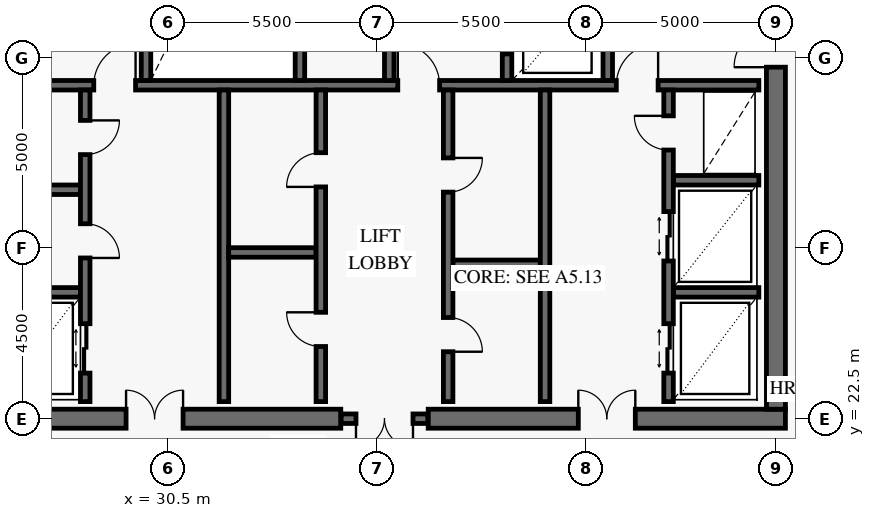
"""IFC4 building model, lengths in metres.
Left out: names, types, materials, properties, quantities, classifications, styles, units other than length and angle.
Written with IfcOpenShell. Run it as: python <this file> out.ifc"""

import sys

from ifc_helpers import new_model, si_unit, direction, frame, frame_2d, origin, place, context, subcontext, project, spatial, rectangle, extrude, element, fill, save


model = new_model("IFC4")
c1 = context("Model", 3, precision=1e-05, world=origin(), true_north=direction((0.0, 1.0)))
c2 = subcontext(c1, "Body", "Model", "MODEL_VIEW")
j1 = project(units=[si_unit("LENGTHUNIT", "METRE"), si_unit("PLANEANGLEUNIT", "RADIAN")], contexts=[c1])
p1 = place(None, origin())
s1 = spatial("IfcSite", under=j1, at=p1, CompositionType="ELEMENT")
p2 = place(p1, origin())
s2 = spatial("IfcBuilding", under=s1, at=p2, CompositionType="ELEMENT")
p3 = place(p2, frame((0.0, 0.0, 357.6)))
s3 = spatial("IfcBuildingStorey", under=s2, at=p3, CompositionType="ELEMENT", Elevation=357.6)
p4 = place(p3, frame((25.25, 22.5, 0.0), z_axis=(0.0, 0.0, 1.0), x_axis=(1.0, 0.0, 0.0)))
e1 = element("IfcWall", 1, at=p4, inside=s3, PredefinedType="SHEAR", context=c2, shape_type="SweptSolid", body=[
    extrude(rectangle(XDim=9.8, YDim=0.5, at=frame_2d((4.9, 0.0))), origin(), (0.0, 0.0, 1.0), 3.8),
])
p5 = place(p4, frame((4.15, 0.0, 0.0)))
e2 = element("IfcOpeningElement", 2, at=p5, cuts=e1, PredefinedType="OPENING", context=c2, shape_type="SweptSolid", body=[
    extrude(rectangle(XDim=1.5, YDim=2.15, at=frame_2d((0.75, 1.075))), frame((0.0, 0.262, 0.0), z_axis=(0.0, -1.0, 0.0), x_axis=(1.0, 0.0, 0.0)), (0.0, 0.0, 1.0), 0.524),
])
p6 = place(p3, frame((37.35, 22.5, 0.0), z_axis=(0.0, 0.0, 1.0), x_axis=(1.0, 0.0, 0.0)))
e3 = element("IfcWall", 3, at=p6, inside=s3, PredefinedType="SHEAR", context=c2, shape_type="SweptSolid", body=[
    extrude(rectangle(XDim=9.4, YDim=0.5, at=frame_2d((4.7, 0.0))), origin(), (0.0, 0.0, 1.0), 3.8),
])
p7 = place(p6, frame((3.95, 0.0, 0.0)))
e4 = element("IfcOpeningElement", 4, at=p7, cuts=e3, PredefinedType="OPENING", context=c2, shape_type="SweptSolid", body=[
    extrude(rectangle(XDim=1.5, YDim=2.15, at=frame_2d((0.75, 1.075))), frame((0.0, 0.262, 0.0), z_axis=(0.0, -1.0, 0.0), x_axis=(1.0, 0.0, 0.0)), (0.0, 0.0, 1.0), 0.524),
])
p8 = place(p3, frame((46.5, 22.75, 0.0), z_axis=(0.0, 0.0, 1.0), x_axis=(0.0, 1.0, 0.0)))
e5 = element("IfcWall", 5, at=p8, inside=s3, PredefinedType="SHEAR", context=c2, shape_type="SweptSolid", body=[
    extrude(rectangle(XDim=18.5, YDim=0.5, at=frame_2d((9.25, 0.0))), origin(), (0.0, 0.0, 1.0), 3.8),
])
p9 = place(p8, frame((9.0, 0.0, 0.0)))
e6 = element("IfcOpeningElement", 6, at=p9, cuts=e5, PredefinedType="OPENING", context=c2, shape_type="SweptSolid", body=[
    extrude(rectangle(XDim=1.1, YDim=2.15, at=frame_2d((0.55, 1.075))), frame((0.0, 0.262, 0.0), z_axis=(0.0, -1.0, 0.0), x_axis=(1.0, 0.0, 0.0)), (0.0, 0.0, 1.0), 0.524),
])
p10 = place(p3, frame((35.06, 22.5, 0.0), z_axis=(0.0, 0.0, 1.0), x_axis=(1.0, 0.0, 0.0)))
e7 = element("IfcWall", 7, at=p10, inside=s3, PredefinedType="SOLIDWALL", context=c2, shape_type="SweptSolid", body=[
    extrude(rectangle(XDim=2.28, YDim=0.25, at=frame_2d((1.14, 0.0))), origin(), (0.0, 0.0, 1.0), 3.8),
])
p11 = place(p10, frame((0.39, 0.0, 0.0)))
e8 = element("IfcOpeningElement", 8, at=p11, cuts=e7, PredefinedType="OPENING", context=c2, shape_type="SweptSolid", body=[
    extrude(rectangle(XDim=1.5, YDim=2.15, at=frame_2d((0.75, 1.075))), frame((0.0, 0.137, 0.0), z_axis=(0.0, -1.0, 0.0), x_axis=(1.0, 0.0, 0.0)), (0.0, 0.0, 1.0), 0.274),
])
p12 = place(p3, frame((25.95, 31.275, 0.0), z_axis=(0.0, 0.0, 1.0), x_axis=(1.0, 0.0, 0.0)))
e9 = element("IfcWall", 9, at=p12, inside=s3, PredefinedType="SOLIDWALL", context=c2, shape_type="SweptSolid", body=[
    extrude(rectangle(XDim=20.1, YDim=0.25, at=frame_2d((10.05, 0.0))), origin(), (0.0, 0.0, 1.0), 3.8),
])
p13 = place(p12, frame((2.6, 0.0, 0.0)))
e10 = element("IfcOpeningElement", 10, at=p13, cuts=e9, PredefinedType="OPENING", context=c2, shape_type="SweptSolid", body=[
    extrude(rectangle(XDim=1.1, YDim=2.15, at=frame_2d((0.55, 1.075))), frame((0.0, 0.137, 0.0), z_axis=(0.0, -1.0, 0.0), x_axis=(1.0, 0.0, 0.0)), (0.0, 0.0, 1.0), 0.274),
])
p14 = place(p12, frame((10.6, 0.0, 0.0)))
e11 = element("IfcOpeningElement", 11, at=p14, cuts=e9, PredefinedType="OPENING", context=c2, shape_type="SweptSolid", body=[
    extrude(rectangle(XDim=1.1, YDim=2.15, at=frame_2d((0.55, 1.075))), frame((0.0, 0.137, 0.0), z_axis=(0.0, -1.0, 0.0), x_axis=(1.0, 0.0, 0.0)), (0.0, 0.0, 1.0), 0.274),
])
p15 = place(p12, frame((16.35, 0.0, 0.0)))
e12 = element("IfcOpeningElement", 12, at=p15, cuts=e9, PredefinedType="OPENING", context=c2, shape_type="SweptSolid", body=[
    extrude(rectangle(XDim=1.1, YDim=2.15, at=frame_2d((0.55, 1.075))), frame((0.0, 0.137, 0.0), z_axis=(0.0, -1.0, 0.0), x_axis=(1.0, 0.0, 0.0)), (0.0, 0.0, 1.0), 0.274),
])
for number, where, z_axis, x_axis in (
    (13, (29.925, 31.4, 0.0), (0.0, 0.0, 1.0), (0.0, 1.0, 0.0)),
    (14, (33.975, 31.4, 0.0), (0.0, 0.0, 1.0), (0.0, 1.0, 0.0)),
    (15, (42.075, 31.4, 0.0), (0.0, 0.0, 1.0), (0.0, 1.0, 0.0)),
):
    element("IfcWall", number, at=place(p3, frame(where, z_axis=z_axis, x_axis=x_axis)), inside=s3, PredefinedType="SOLIDWALL", context=c2, shape_type="SweptSolid", body=[
        extrude(rectangle(XDim=9.7, YDim=0.25, at=frame_2d((4.85, 0.0))), origin(), (0.0, 0.0, 1.0), 3.8),
    ])
p16 = place(p3, frame((36.325, 31.4, 0.0), z_axis=(0.0, 0.0, 1.0), x_axis=(0.0, 1.0, 0.0)))
e16 = element("IfcWall", 16, at=p16, inside=s3, PredefinedType="SOLIDWALL", context=c2, shape_type="SweptSolid", body=[
    extrude(rectangle(XDim=9.65, YDim=0.25, at=frame_2d((4.825, 0.0))), origin(), (0.0, 0.0, 1.0), 3.8),
])
p17 = place(p16, frame((1.49, 0.0, 0.0)))
e17 = element("IfcOpeningElement", 17, at=p17, cuts=e16, PredefinedType="OPENING", context=c2, shape_type="SweptSolid", body=[
    extrude(rectangle(XDim=0.9, YDim=2.1, at=frame_2d((0.45, 1.05))), frame((0.0, 0.137, 0.0), z_axis=(0.0, -1.0, 0.0), x_axis=(1.0, 0.0, 0.0)), (0.0, 0.0, 1.0), 0.274),
])
p18 = place(p16, frame((6.41, 0.0, 0.0)))
e18 = element("IfcOpeningElement", 18, at=p18, cuts=e16, PredefinedType="OPENING", context=c2, shape_type="SweptSolid", body=[
    extrude(rectangle(XDim=0.9, YDim=2.1, at=frame_2d((0.45, 1.05))), frame((0.0, 0.137, 0.0), z_axis=(0.0, -1.0, 0.0), x_axis=(1.0, 0.0, 0.0)), (0.0, 0.0, 1.0), 0.274),
])
p19 = place(p3, frame((39.425, 31.4, 0.0), z_axis=(0.0, 0.0, 1.0), x_axis=(0.0, 1.0, 0.0)))
e19 = element("IfcWall", 19, at=p19, inside=s3, PredefinedType="SOLIDWALL", context=c2, shape_type="SweptSolid", body=[
    extrude(rectangle(XDim=9.65, YDim=0.25, at=frame_2d((4.825, 0.0))), origin(), (0.0, 0.0, 1.0), 3.8),
])
p20 = place(p19, frame((0.7, 0.0, 0.0)))
e20 = element("IfcOpeningElement", 20, at=p20, cuts=e19, PredefinedType="OPENING", context=c2, shape_type="SweptSolid", body=[
    extrude(rectangle(XDim=1.1, YDim=2.2, at=frame_2d((0.55, 1.1))), frame((0.0, 0.137, 0.0), z_axis=(0.0, -1.0, 0.0), x_axis=(1.0, 0.0, 0.0)), (0.0, 0.0, 1.0), 0.274),
])
p21 = place(p19, frame((3.45, 0.0, 0.0)))
e21 = element("IfcOpeningElement", 21, at=p21, cuts=e19, PredefinedType="OPENING", context=c2, shape_type="SweptSolid", body=[
    extrude(rectangle(XDim=1.1, YDim=2.2, at=frame_2d((0.55, 1.1))), frame((0.0, 0.137, 0.0), z_axis=(0.0, -1.0, 0.0), x_axis=(1.0, 0.0, 0.0)), (0.0, 0.0, 1.0), 0.274),
])
p22 = place(p19, frame((6.2, 0.0, 0.0)))
e22 = element("IfcOpeningElement", 22, at=p22, cuts=e19, PredefinedType="OPENING", context=c2, shape_type="SweptSolid", body=[
    extrude(rectangle(XDim=1.1, YDim=2.2, at=frame_2d((0.55, 1.1))), frame((0.0, 0.137, 0.0), z_axis=(0.0, -1.0, 0.0), x_axis=(1.0, 0.0, 0.0)), (0.0, 0.0, 1.0), 0.274),
])
p23 = place(p19, frame((8.47, 0.0, 0.0)))
e23 = element("IfcOpeningElement", 23, at=p23, cuts=e19, PredefinedType="OPENING", context=c2, shape_type="SweptSolid", body=[
    extrude(rectangle(XDim=0.9, YDim=2.1, at=frame_2d((0.45, 1.05))), frame((0.0, 0.137, 0.0), z_axis=(0.0, -1.0, 0.0), x_axis=(1.0, 0.0, 0.0)), (0.0, 0.0, 1.0), 0.274),
])
for number, where, z_axis, x_axis in (
    (24, (25.95, 25.825, 0.0), (0.0, 0.0, 1.0), (1.0, 0.0, 0.0)),
    (25, (25.95, 28.525, 0.0), (0.0, 0.0, 1.0), (1.0, 0.0, 0.0)),
):
    element("IfcWall", number, at=place(p3, frame(where, z_axis=z_axis, x_axis=x_axis)), inside=s3, PredefinedType="SOLIDWALL", context=c2, shape_type="SweptSolid", body=[
        extrude(rectangle(XDim=2.25, YDim=0.25, at=frame_2d((1.125, 0.0))), origin(), (0.0, 0.0, 1.0), 3.8),
    ])
p24 = place(p3, frame((28.325, 22.95, 0.0), z_axis=(0.0, 0.0, 1.0), x_axis=(0.0, 1.0, 0.0)))
e26 = element("IfcWall", 26, at=p24, inside=s3, PredefinedType="SOLIDWALL", context=c2, shape_type="SweptSolid", body=[
    extrude(rectangle(XDim=8.2, YDim=0.25, at=frame_2d((4.1, 0.0))), origin(), (0.0, 0.0, 1.0), 3.8),
])
p25 = place(p24, frame((0.75, 0.0, 0.0)))
e27 = element("IfcOpeningElement", 27, at=p25, cuts=e26, PredefinedType="OPENING", context=c2, shape_type="SweptSolid", body=[
    extrude(rectangle(XDim=1.3, YDim=2.3, at=frame_2d((0.65, 1.15))), frame((0.0, 0.137, 0.0), z_axis=(0.0, -1.0, 0.0), x_axis=(1.0, 0.0, 0.0)), (0.0, 0.0, 1.0), 0.274),
])
p26 = place(p24, frame((3.78, 0.0, 0.0)))
e28 = element("IfcOpeningElement", 28, at=p26, cuts=e26, PredefinedType="OPENING", context=c2, shape_type="SweptSolid", body=[
    extrude(rectangle(XDim=0.9, YDim=2.1, at=frame_2d((0.45, 1.05))), frame((0.0, 0.137, 0.0), z_axis=(0.0, -1.0, 0.0), x_axis=(1.0, 0.0, 0.0)), (0.0, 0.0, 1.0), 0.274),
])
p27 = place(p24, frame((6.5, 0.0, 0.0)))
e29 = element("IfcOpeningElement", 29, at=p27, cuts=e26, PredefinedType="OPENING", context=c2, shape_type="SweptSolid", body=[
    extrude(rectangle(XDim=0.9, YDim=2.1, at=frame_2d((0.45, 1.05))), frame((0.0, 0.137, 0.0), z_axis=(0.0, -1.0, 0.0), x_axis=(1.0, 0.0, 0.0)), (0.0, 0.0, 1.0), 0.274),
])
p28 = place(p3, frame((31.975, 22.95, 0.0), z_axis=(0.0, 0.0, 1.0), x_axis=(0.0, 1.0, 0.0)))
e30 = element("IfcWall", 30, at=p28, inside=s3, PredefinedType="SOLIDWALL", context=c2, shape_type="SweptSolid", body=[
    extrude(rectangle(XDim=8.2, YDim=0.25, at=frame_2d((4.1, 0.0))), origin(), (0.0, 0.0, 1.0), 3.8),
])
p29 = place(p3, frame((32.1, 26.875, 0.0), z_axis=(0.0, 0.0, 1.0), x_axis=(1.0, 0.0, 0.0)))
e31 = element("IfcWall", 31, at=p29, inside=s3, PredefinedType="SOLIDWALL", context=c2, shape_type="SweptSolid", body=[
    extrude(rectangle(XDim=2.3, YDim=0.25, at=frame_2d((1.15, 0.0))), origin(), (0.0, 0.0, 1.0), 3.8),
])
p30 = place(p3, frame((34.525, 22.95, 0.0), z_axis=(0.0, 0.0, 1.0), x_axis=(0.0, 1.0, 0.0)))
e32 = element("IfcWall", 32, at=p30, inside=s3, PredefinedType="SOLIDWALL", context=c2, shape_type="SweptSolid", body=[
    extrude(rectangle(XDim=8.2, YDim=0.25, at=frame_2d((4.1, 0.0))), origin(), (0.0, 0.0, 1.0), 3.8),
])
p31 = place(p30, frame((1.45, 0.0, 0.0)))
e33 = element("IfcOpeningElement", 33, at=p31, cuts=e32, PredefinedType="OPENING", context=c2, shape_type="SweptSolid", body=[
    extrude(rectangle(XDim=0.9, YDim=2.1, at=frame_2d((0.45, 1.05))), frame((0.0, 0.137, 0.0), z_axis=(0.0, -1.0, 0.0), x_axis=(1.0, 0.0, 0.0)), (0.0, 0.0, 1.0), 0.274),
])
p32 = place(p30, frame((5.65, 0.0, 0.0)))
e34 = element("IfcOpeningElement", 34, at=p32, cuts=e32, PredefinedType="OPENING", context=c2, shape_type="SweptSolid", body=[
    extrude(rectangle(XDim=0.9, YDim=2.1, at=frame_2d((0.45, 1.05))), frame((0.0, 0.137, 0.0), z_axis=(0.0, -1.0, 0.0), x_axis=(1.0, 0.0, 0.0)), (0.0, 0.0, 1.0), 0.274),
])
p33 = place(p3, frame((38.0, 26.55, 0.0), z_axis=(0.0, 0.0, 1.0), x_axis=(1.0, 0.0, 0.0)))
e35 = element("IfcWall", 35, at=p33, inside=s3, PredefinedType="SOLIDWALL", context=c2, shape_type="SweptSolid", body=[
    extrude(rectangle(XDim=2.3, YDim=0.25, at=frame_2d((1.15, 0.0))), origin(), (0.0, 0.0, 1.0), 3.8),
])
p34 = place(p3, frame((37.875, 22.95, 0.0), z_axis=(0.0, 0.0, 1.0), x_axis=(0.0, 1.0, 0.0)))
e36 = element("IfcWall", 36, at=p34, inside=s3, PredefinedType="SOLIDWALL", context=c2, shape_type="SweptSolid", body=[
    extrude(rectangle(XDim=8.2, YDim=0.25, at=frame_2d((4.1, 0.0))), origin(), (0.0, 0.0, 1.0), 3.8),
])
p35 = place(p34, frame((1.312, 0.0, 0.0)))
e37 = element("IfcOpeningElement", 37, at=p35, cuts=e36, PredefinedType="OPENING", context=c2, shape_type="SweptSolid", body=[
    extrude(rectangle(XDim=0.9, YDim=2.1, at=frame_2d((0.45, 1.05))), frame((0.0, 0.137, 0.0), z_axis=(0.0, -1.0, 0.0), x_axis=(1.0, 0.0, 0.0)), (0.0, 0.0, 1.0), 0.274),
])
p36 = place(p34, frame((5.512, 0.0, 0.0)))
e38 = element("IfcOpeningElement", 38, at=p36, cuts=e36, PredefinedType="OPENING", context=c2, shape_type="SweptSolid", body=[
    extrude(rectangle(XDim=0.9, YDim=2.1, at=frame_2d((0.45, 1.05))), frame((0.0, 0.137, 0.0), z_axis=(0.0, -1.0, 0.0), x_axis=(1.0, 0.0, 0.0)), (0.0, 0.0, 1.0), 0.274),
])
p37 = place(p3, frame((40.425, 22.95, 0.0), z_axis=(0.0, 0.0, 1.0), x_axis=(0.0, 1.0, 0.0)))
e39 = element("IfcWall", 39, at=p37, inside=s3, PredefinedType="SOLIDWALL", context=c2, shape_type="SweptSolid", body=[
    extrude(rectangle(XDim=8.2, YDim=0.25, at=frame_2d((4.1, 0.0))), origin(), (0.0, 0.0, 1.0), 3.8),
])
for number, where, z_axis, x_axis in (
    (40, (43.8, 25.825, 0.0), (0.0, 0.0, 1.0), (1.0, 0.0, 0.0)),
    (41, (43.8, 28.775, 0.0), (0.0, 0.0, 1.0), (1.0, 0.0, 0.0)),
):
    element("IfcWall", number, at=place(p3, frame(where, z_axis=z_axis, x_axis=x_axis)), inside=s3, PredefinedType="SOLIDWALL", context=c2, shape_type="SweptSolid", body=[
        extrude(rectangle(XDim=2.25, YDim=0.25, at=frame_2d((1.125, 0.0))), origin(), (0.0, 0.0, 1.0), 3.8),
    ])
p38 = place(p3, frame((43.675, 22.95, 0.0), z_axis=(0.0, 0.0, 1.0), x_axis=(0.0, 1.0, 0.0)))
e42 = element("IfcWall", 42, at=p38, inside=s3, PredefinedType="SOLIDWALL", context=c2, shape_type="SweptSolid", body=[
    extrude(rectangle(XDim=8.2, YDim=0.25, at=frame_2d((4.1, 0.0))), origin(), (0.0, 0.0, 1.0), 3.8),
])
p39 = place(p38, frame((0.75, 0.0, 0.0)))
e43 = element("IfcOpeningElement", 43, at=p39, cuts=e42, PredefinedType="OPENING", context=c2, shape_type="SweptSolid", body=[
    extrude(rectangle(XDim=1.3, YDim=2.3, at=frame_2d((0.65, 1.15))), frame((0.0, 0.137, 0.0), z_axis=(0.0, -1.0, 0.0), x_axis=(1.0, 0.0, 0.0)), (0.0, 0.0, 1.0), 0.274),
])
p40 = place(p38, frame((3.7, 0.0, 0.0)))
e44 = element("IfcOpeningElement", 44, at=p40, cuts=e42, PredefinedType="OPENING", context=c2, shape_type="SweptSolid", body=[
    extrude(rectangle(XDim=1.3, YDim=2.3, at=frame_2d((0.65, 1.15))), frame((0.0, 0.137, 0.0), z_axis=(0.0, -1.0, 0.0), x_axis=(1.0, 0.0, 0.0)), (0.0, 0.0, 1.0), 0.274),
])
p41 = place(p38, frame((6.62, 0.0, 0.0)))
e45 = element("IfcOpeningElement", 45, at=p41, cuts=e42, PredefinedType="OPENING", context=c2, shape_type="SweptSolid", body=[
    extrude(rectangle(XDim=0.9, YDim=2.1, at=frame_2d((0.45, 1.05))), frame((0.0, 0.137, 0.0), z_axis=(0.0, -1.0, 0.0), x_axis=(1.0, 0.0, 0.0)), (0.0, 0.0, 1.0), 0.274),
])
p42 = place(p9, origin())
e46 = element("IfcDoor", 46, at=p42, inside=s3, OperationType="SINGLE_SWING_LEFT", PredefinedType="USERDEFINED", context=c2, shape_type="SweptSolid", body=[
    extrude(rectangle(XDim=1.1, YDim=2.15, at=frame_2d((0.55, 1.075))), frame((0.0, 0.025, 0.0), z_axis=(0.0, -1.0, 0.0), x_axis=(1.0, 0.0, 0.0)), (0.0, 0.0, 1.0), 0.05),
])
fill(e6, e46)
p43 = place(p5, origin())
e47 = element("IfcDoor", 47, at=p43, inside=s3, OperationType="DOUBLE_DOOR_SINGLE_SWING", PredefinedType="DOOR", context=c2, shape_type="SweptSolid", body=[
    extrude(rectangle(XDim=1.5, YDim=2.15, at=frame_2d((0.75, 1.075))), frame((0.0, 0.025, 0.0), z_axis=(0.0, -1.0, 0.0), x_axis=(1.0, 0.0, 0.0)), (0.0, 0.0, 1.0), 0.05),
])
fill(e2, e47)
p44 = place(p7, origin())
e48 = element("IfcDoor", 48, at=p44, inside=s3, OperationType="DOUBLE_DOOR_SINGLE_SWING", PredefinedType="DOOR", context=c2, shape_type="SweptSolid", body=[
    extrude(rectangle(XDim=1.5, YDim=2.15, at=frame_2d((0.75, 1.075))), frame((0.0, 0.025, 0.0), z_axis=(0.0, -1.0, 0.0), x_axis=(1.0, 0.0, 0.0)), (0.0, 0.0, 1.0), 0.05),
])
fill(e4, e48)
p45 = place(p11, frame((1.5, 0.0, 0.0), z_axis=(0.0, 0.0, 1.0), x_axis=(-1.0, 0.0, 0.0)))
e49 = element("IfcDoor", 49, at=p45, inside=s3, OperationType="DOUBLE_DOOR_SINGLE_SWING", PredefinedType="DOOR", context=c2, shape_type="SweptSolid", body=[
    extrude(rectangle(XDim=1.5, YDim=2.15, at=frame_2d((0.75, 1.075))), frame((0.0, 0.025, 0.0), z_axis=(0.0, -1.0, 0.0), x_axis=(1.0, 0.0, 0.0)), (0.0, 0.0, 1.0), 0.05),
])
fill(e8, e49)
p46 = place(p13, origin())
e50 = element("IfcDoor", 50, at=p46, inside=s3, OperationType="SINGLE_SWING_RIGHT", PredefinedType="USERDEFINED", context=c2, shape_type="SweptSolid", body=[
    extrude(rectangle(XDim=1.1, YDim=2.15, at=frame_2d((0.55, 1.075))), frame((0.0, 0.025, 0.0), z_axis=(0.0, -1.0, 0.0), x_axis=(1.0, 0.0, 0.0)), (0.0, 0.0, 1.0), 0.05),
])
fill(e10, e50)
p47 = place(p14, origin())
e51 = element("IfcDoor", 51, at=p47, inside=s3, OperationType="SINGLE_SWING_LEFT", PredefinedType="USERDEFINED", context=c2, shape_type="SweptSolid", body=[
    extrude(rectangle(XDim=1.1, YDim=2.15, at=frame_2d((0.55, 1.075))), frame((0.0, 0.025, 0.0), z_axis=(0.0, -1.0, 0.0), x_axis=(1.0, 0.0, 0.0)), (0.0, 0.0, 1.0), 0.05),
])
fill(e11, e51)
p48 = place(p15, origin())
e52 = element("IfcDoor", 52, at=p48, inside=s3, OperationType="SINGLE_SWING_RIGHT", PredefinedType="USERDEFINED", context=c2, shape_type="SweptSolid", body=[
    extrude(rectangle(XDim=1.1, YDim=2.15, at=frame_2d((0.55, 1.075))), frame((0.0, 0.025, 0.0), z_axis=(0.0, -1.0, 0.0), x_axis=(1.0, 0.0, 0.0)), (0.0, 0.0, 1.0), 0.05),
])
fill(e12, e52)
p49 = place(p20, origin())
e53 = element("IfcDoor", 53, at=p49, inside=s3, OperationType="DOUBLE_DOOR_SLIDING", PredefinedType="DOOR", context=c2, shape_type="SweptSolid", body=[
    extrude(rectangle(XDim=1.1, YDim=2.2, at=frame_2d((0.55, 1.1))), frame((0.0, 0.025, 0.0), z_axis=(0.0, -1.0, 0.0), x_axis=(1.0, 0.0, 0.0)), (0.0, 0.0, 1.0), 0.05),
])
fill(e20, e53)
p50 = place(p25, frame((1.3, 0.0, 0.0), z_axis=(0.0, 0.0, 1.0), x_axis=(-1.0, 0.0, 0.0)))
e54 = element("IfcDoor", 54, at=p50, inside=s3, OperationType="DOUBLE_DOOR_SLIDING", PredefinedType="DOOR", context=c2, shape_type="SweptSolid", body=[
    extrude(rectangle(XDim=1.3, YDim=2.3, at=frame_2d((0.65, 1.15))), frame((0.0, 0.025, 0.0), z_axis=(0.0, -1.0, 0.0), x_axis=(1.0, 0.0, 0.0)), (0.0, 0.0, 1.0), 0.05),
])
fill(e27, e54)
p51 = place(p26, frame((0.9, 0.0, 0.0), z_axis=(0.0, 0.0, 1.0), x_axis=(-1.0, 0.0, 0.0)))
e55 = element("IfcDoor", 55, at=p51, inside=s3, OperationType="SINGLE_SWING_RIGHT", PredefinedType="DOOR", context=c2, shape_type="SweptSolid", body=[
    extrude(rectangle(XDim=0.9, YDim=2.1, at=frame_2d((0.45, 1.05))), frame((0.0, 0.025, 0.0), z_axis=(0.0, -1.0, 0.0), x_axis=(1.0, 0.0, 0.0)), (0.0, 0.0, 1.0), 0.05),
])
fill(e28, e55)
p52 = place(p27, frame((0.9, 0.0, 0.0), z_axis=(0.0, 0.0, 1.0), x_axis=(-1.0, 0.0, 0.0)))
e56 = element("IfcDoor", 56, at=p52, inside=s3, OperationType="SINGLE_SWING_LEFT", PredefinedType="DOOR", context=c2, shape_type="SweptSolid", body=[
    extrude(rectangle(XDim=0.9, YDim=2.1, at=frame_2d((0.45, 1.05))), frame((0.0, 0.025, 0.0), z_axis=(0.0, -1.0, 0.0), x_axis=(1.0, 0.0, 0.0)), (0.0, 0.0, 1.0), 0.05),
])
fill(e29, e56)
p53 = place(p31, origin())
e57 = element("IfcDoor", 57, at=p53, inside=s3, OperationType="SINGLE_SWING_RIGHT", PredefinedType="DOOR", context=c2, shape_type="SweptSolid", body=[
    extrude(rectangle(XDim=0.9, YDim=2.1, at=frame_2d((0.45, 1.05))), frame((0.0, 0.025, 0.0), z_axis=(0.0, -1.0, 0.0), x_axis=(1.0, 0.0, 0.0)), (0.0, 0.0, 1.0), 0.05),
])
fill(e33, e57)
p54 = place(p32, origin())
e58 = element("IfcDoor", 58, at=p54, inside=s3, OperationType="SINGLE_SWING_LEFT", PredefinedType="DOOR", context=c2, shape_type="SweptSolid", body=[
    extrude(rectangle(XDim=0.9, YDim=2.1, at=frame_2d((0.45, 1.05))), frame((0.0, 0.025, 0.0), z_axis=(0.0, -1.0, 0.0), x_axis=(1.0, 0.0, 0.0)), (0.0, 0.0, 1.0), 0.05),
])
fill(e34, e58)
p55 = place(p35, frame((0.9, 0.0, 0.0), z_axis=(0.0, 0.0, 1.0), x_axis=(-1.0, 0.0, 0.0)))
e59 = element("IfcDoor", 59, at=p55, inside=s3, OperationType="SINGLE_SWING_RIGHT", PredefinedType="DOOR", context=c2, shape_type="SweptSolid", body=[
    extrude(rectangle(XDim=0.9, YDim=2.1, at=frame_2d((0.45, 1.05))), frame((0.0, 0.025, 0.0), z_axis=(0.0, -1.0, 0.0), x_axis=(1.0, 0.0, 0.0)), (0.0, 0.0, 1.0), 0.05),
])
fill(e37, e59)
p56 = place(p36, frame((0.9, 0.0, 0.0), z_axis=(0.0, 0.0, 1.0), x_axis=(-1.0, 0.0, 0.0)))
e60 = element("IfcDoor", 60, at=p56, inside=s3, OperationType="SINGLE_SWING_LEFT", PredefinedType="DOOR", context=c2, shape_type="SweptSolid", body=[
    extrude(rectangle(XDim=0.9, YDim=2.1, at=frame_2d((0.45, 1.05))), frame((0.0, 0.025, 0.0), z_axis=(0.0, -1.0, 0.0), x_axis=(1.0, 0.0, 0.0)), (0.0, 0.0, 1.0), 0.05),
])
fill(e38, e60)
p57 = place(p39, origin())
e61 = element("IfcDoor", 61, at=p57, inside=s3, OperationType="DOUBLE_DOOR_SLIDING", PredefinedType="DOOR", context=c2, shape_type="SweptSolid", body=[
    extrude(rectangle(XDim=1.3, YDim=2.3, at=frame_2d((0.65, 1.15))), frame((0.0, 0.025, 0.0), z_axis=(0.0, -1.0, 0.0), x_axis=(1.0, 0.0, 0.0)), (0.0, 0.0, 1.0), 0.05),
])
fill(e43, e61)
p58 = place(p40, origin())
e62 = element("IfcDoor", 62, at=p58, inside=s3, OperationType="DOUBLE_DOOR_SLIDING", PredefinedType="DOOR", context=c2, shape_type="SweptSolid", body=[
    extrude(rectangle(XDim=1.3, YDim=2.3, at=frame_2d((0.65, 1.15))), frame((0.0, 0.025, 0.0), z_axis=(0.0, -1.0, 0.0), x_axis=(1.0, 0.0, 0.0)), (0.0, 0.0, 1.0), 0.05),
])
fill(e44, e62)
p59 = place(p41, origin())
e63 = element("IfcDoor", 63, at=p59, inside=s3, OperationType="SINGLE_SWING_RIGHT", PredefinedType="DOOR", context=c2, shape_type="SweptSolid", body=[
    extrude(rectangle(XDim=0.9, YDim=2.1, at=frame_2d((0.45, 1.05))), frame((0.0, 0.025, 0.0), z_axis=(0.0, -1.0, 0.0), x_axis=(1.0, 0.0, 0.0)), (0.0, 0.0, 1.0), 0.05),
])
fill(e45, e63)
save(model, sys.argv[1])
